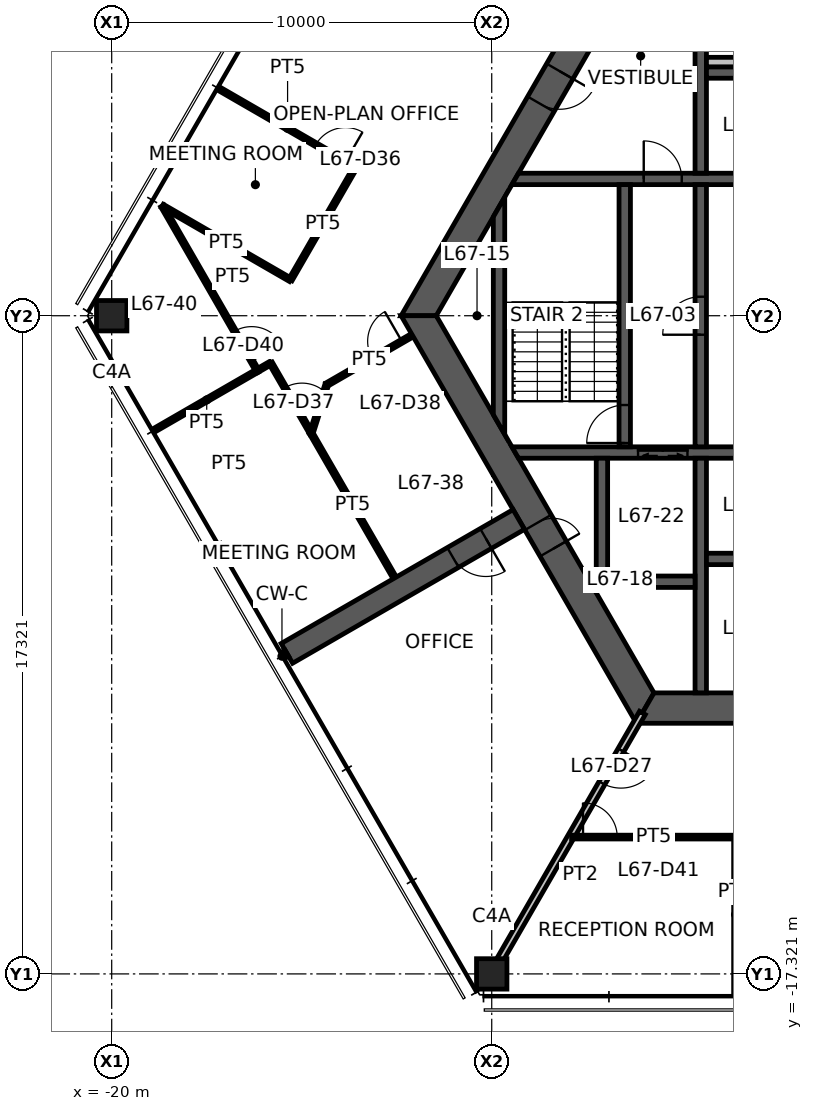
"""IFC4 building model, lengths in metres.
Left out: names, types, materials, properties, quantities, classifications, styles, units other than length and angle.
Written with IfcOpenShell. Run it as: python <this file> out.ifc"""

import sys

from ifc_helpers import new_model, si_unit, direction, frame, frame_2d, origin, origin_2d, place, context, subcontext, project, spatial, polyline, rectangle, hollow_rectangle, outline, extrude, element, fill, save


model = new_model("IFC4")
c1 = context("Model", 3, precision=1e-05, world=origin(), true_north=direction((0.0, 1.0)))
c2 = subcontext(c1, "Body", "Model", "MODEL_VIEW")
j1 = project(units=[si_unit("LENGTHUNIT", "METRE"), si_unit("PLANEANGLEUNIT", "RADIAN")], contexts=[c1])
p1 = place(None, origin())
s1 = spatial("IfcSite", under=j1, at=p1, CompositionType="ELEMENT")
p2 = place(p1, origin())
s2 = spatial("IfcBuilding", under=s1, at=p2, CompositionType="ELEMENT")
p3 = place(p2, frame((0.0, 0.0, 267.4)))
s3 = spatial("IfcBuildingStorey", under=s2, at=p3, CompositionType="ELEMENT", Elevation=267.4)
for number, where, z_axis, x_axis in (
    (1, (-20.0, 0.0, 0.0), (0.0, 0.0, 1.0), (1.0, 0.0, 0.0)),
    (2, (-10.0, -17.321, 0.0), (0.0, 0.0, 1.0), (1.0, 0.0, 0.0)),
):
    element("IfcColumn", number, at=place(p3, frame(where, z_axis=z_axis, x_axis=x_axis)), inside=s3, PredefinedType="COLUMN", context=c2, shape_type="SweptSolid", body=[
        extrude(hollow_rectangle(XDim=0.8, YDim=0.8, WallThickness=0.04, at=origin_2d()), origin(), (0.0, 0.0, 1.0), 3.9),
    ])
p4 = place(p3, frame((-5.961, 10.325, 0.0), z_axis=(0.0, 0.0, 1.0), x_axis=(-0.500004296715, -0.866022923061, 0.0)))
e3 = element("IfcWall", 3, at=p4, inside=s3, PredefinedType="SHEAR", context=c2, shape_type="SweptSolid", body=[
    extrude(outline(polyline([(-0.231, -0.4), (4.494, -0.4), (5.494, -0.4), (12.153, -0.4), (11.691, 0.4), (5.494, 0.4), (4.494, 0.4), (0.231, 0.4), (-0.231, -0.4)])), origin(), (0.0, 0.0, 1.0), 3.9),
])
p5 = place(p4, frame((4.494, 0.0, 0.0)))
e4 = element("IfcOpeningElement", 4, at=p5, cuts=e3, PredefinedType="OPENING", context=c2, shape_type="SweptSolid", body=[
    extrude(rectangle(XDim=1.0, YDim=2.1, at=frame_2d((0.5, 1.05))), frame((0.0, 0.41, 0.0), z_axis=(0.0, -1.0, 0.0), x_axis=(1.0, 0.0, 0.0)), (0.0, 0.0, 1.0), 0.82),
])
p6 = place(p3, frame((-11.922, 0.0, 0.0), z_axis=(0.0, 0.0, 1.0), x_axis=(0.500004296715, -0.866022923061, 0.0)))
e5 = element("IfcWall", 5, at=p6, inside=s3, PredefinedType="SHEAR", context=c2, shape_type="SweptSolid", body=[
    extrude(outline(polyline([(-0.231, -0.4), (6.281, -0.4), (7.081, -0.4), (12.153, -0.4), (11.691, 0.4), (7.081, 0.4), (6.281, 0.4), (0.231, 0.4), (-0.231, -0.4)])), origin(), (0.0, 0.0, 1.0), 3.9),
])
p7 = place(p6, frame((6.281, 0.0, 0.0)))
e6 = element("IfcOpeningElement", 6, at=p7, cuts=e5, PredefinedType="OPENING", context=c2, shape_type="SweptSolid", body=[
    extrude(rectangle(XDim=0.8, YDim=2.1, at=frame_2d((0.4, 1.05))), frame((0.0, 0.41, 0.0), z_axis=(0.0, -1.0, 0.0), x_axis=(1.0, 0.0, 0.0)), (0.0, 0.0, 1.0), 0.82),
])
p8 = place(p3, frame((-5.961, -10.325, 0.0), z_axis=(0.0, 0.0, 1.0), x_axis=(1.0, 0.0, 0.0)))
e7 = element("IfcWall", 7, at=p8, inside=s3, PredefinedType="SHEAR", context=c2, shape_type="SweptSolid", body=[
    extrude(outline(polyline([(-0.231, -0.4), (5.461, -0.4), (6.461, -0.4), (12.153, -0.4), (11.691, 0.4), (6.461, 0.4), (5.461, 0.4), (0.231, 0.4), (-0.231, -0.4)])), origin(), (0.0, 0.0, 1.0), 3.9),
])
p9 = place(p8, frame((5.461, 0.0, 0.0)))
e8 = element("IfcOpeningElement", 8, at=p9, cuts=e7, PredefinedType="OPENING", context=c2, shape_type="SweptSolid", body=[
    extrude(rectangle(XDim=1.0, YDim=2.1, at=frame_2d((0.5, 1.05))), frame((0.0, 0.41, 0.0), z_axis=(0.0, -1.0, 0.0), x_axis=(1.0, 0.0, 0.0)), (0.0, 0.0, 1.0), 0.82),
])
p10 = place(p3, frame((-9.288, -5.363, 0.0), z_axis=(0.0, 0.0, 1.0), x_axis=(-0.866027473358, -0.499996415376, 0.0)))
e9 = element("IfcWall", 9, at=p10, inside=s3, PredefinedType="SHEAR", context=c2, shape_type="SweptSolid", body=[
    extrude(rectangle(XDim=7.045, YDim=0.6, at=frame_2d((3.523, 0.0))), origin(), (0.0, 0.0, 1.0), 3.9),
])
p11 = place(p10, frame((1.0, 0.0, 0.0)))
e10 = element("IfcOpeningElement", 10, at=p11, cuts=e9, PredefinedType="OPENING", context=c2, shape_type="SweptSolid", body=[
    extrude(rectangle(XDim=1.0, YDim=2.1, at=frame_2d((0.5, 1.05))), frame((0.0, 0.31, 0.0), z_axis=(0.0, -1.0, 0.0), x_axis=(1.0, 0.0, 0.0)), (0.0, 0.0, 1.0), 0.62),
])
p12 = place(p3, frame((-9.382, 3.6, 0.0), z_axis=(0.0, 0.0, 1.0), x_axis=(1.0, 0.0, 0.0)))
e11 = element("IfcWall", 11, at=p12, inside=s3, PredefinedType="SHEAR", context=c2, shape_type="SweptSolid", body=[
    extrude(outline(polyline([(-0.087, -0.15), (3.382, -0.15), (4.382, -0.15), (5.782, -0.15), (6.882, -0.15), (7.932, -0.15), (7.932, 0.15), (6.882, 0.15), (5.782, 0.15), (4.382, 0.15), (3.382, 0.15), (0.087, 0.15), (-0.087, -0.15)])), origin(), (0.0, 0.0, 1.0), 3.9),
])
p13 = place(p12, frame((3.382, 0.0, 0.0)))
e12 = element("IfcOpeningElement", 12, at=p13, cuts=e11, PredefinedType="OPENING", context=c2, shape_type="SweptSolid", body=[
    extrude(rectangle(XDim=1.0, YDim=2.1, at=frame_2d((0.5, 1.05))), frame((0.0, 0.16, 0.0), z_axis=(0.0, -1.0, 0.0), x_axis=(1.0, 0.0, 0.0)), (0.0, 0.0, 1.0), 0.32),
])
p14 = place(p12, frame((5.782, 0.0, 0.0)))
e13 = element("IfcOpeningElement", 13, at=p14, cuts=e11, PredefinedType="OPENING", context=c2, shape_type="SweptSolid", body=[
    extrude(rectangle(XDim=1.1, YDim=2.1, at=frame_2d((0.55, 1.05))), frame((0.0, 0.16, 0.0), z_axis=(0.0, -1.0, 0.0), x_axis=(1.0, 0.0, 0.0)), (0.0, 0.0, 1.0), 0.32),
])
p15 = place(p3, frame((-9.382, -3.6, 0.0), z_axis=(0.0, 0.0, 1.0), x_axis=(1.0, 0.0, 0.0)))
e14 = element("IfcWall", 14, at=p15, inside=s3, PredefinedType="SHEAR", context=c2, shape_type="SweptSolid", body=[
    extrude(outline(polyline([(0.087, -0.15), (3.232, -0.15), (4.532, -0.15), (5.782, -0.15), (6.882, -0.15), (7.932, -0.15), (7.932, 0.15), (6.882, 0.15), (5.782, 0.15), (4.532, 0.15), (3.232, 0.15), (-0.087, 0.15), (0.087, -0.15)])), origin(), (0.0, 0.0, 1.0), 3.9),
])
p16 = place(p15, frame((5.782, 0.0, 0.0)))
e15 = element("IfcOpeningElement", 15, at=p16, cuts=e14, PredefinedType="OPENING", context=c2, shape_type="SweptSolid", body=[
    extrude(rectangle(XDim=1.1, YDim=2.1, at=frame_2d((0.55, 1.05))), frame((0.0, 0.16, 0.0), z_axis=(0.0, -1.0, 0.0), x_axis=(1.0, 0.0, 0.0)), (0.0, 0.0, 1.0), 0.32),
])
p17 = place(p15, frame((3.232, 0.0, 0.0)))
e16 = element("IfcOpeningElement", 16, at=p17, cuts=e14, PredefinedType="OPENING", context=c2, shape_type="SweptSolid", body=[
    extrude(rectangle(XDim=1.3, YDim=2.1, at=frame_2d((0.65, 1.05))), frame((0.0, 0.16, 0.0), z_axis=(0.0, -1.0, 0.0), x_axis=(1.0, 0.0, 0.0)), (0.0, 0.0, 1.0), 0.32),
])
p18 = place(p3, frame((-4.5, -3.45, 0.0), z_axis=(0.0, 0.0, 1.0), x_axis=(0.0, 1.0, 0.0)))
e17 = element("IfcWall", 17, at=p18, inside=s3, PredefinedType="SHEAR", context=c2, shape_type="SweptSolid", body=[
    extrude(rectangle(XDim=6.9, YDim=0.3, at=frame_2d((3.45, 0.0))), origin(), (0.0, 0.0, 1.0), 3.9),
])
p19 = place(p18, frame((2.95, 0.0, 0.0)))
e18 = element("IfcOpeningElement", 18, at=p19, cuts=e17, PredefinedType="OPENING", context=c2, shape_type="SweptSolid", body=[
    extrude(rectangle(XDim=1.0, YDim=2.1, at=frame_2d((0.5, 1.05))), frame((0.0, 0.16, 0.0), z_axis=(0.0, -1.0, 0.0), x_axis=(1.0, 0.0, 0.0)), (0.0, 0.0, 1.0), 0.32),
])
p20 = place(p3, frame((-6.5, -3.45, 0.0), z_axis=(0.0, 0.0, 1.0), x_axis=(0.0, 1.0, 0.0)))
e19 = element("IfcWall", 19, at=p20, inside=s3, PredefinedType="SHEAR", context=c2, shape_type="SweptSolid", body=[
    extrude(rectangle(XDim=6.9, YDim=0.3, at=frame_2d((3.45, 0.0))), origin(), (0.0, 0.0, 1.0), 3.9),
])
p21 = place(p20, frame((0.1, 0.0, 0.0)))
e20 = element("IfcOpeningElement", 20, at=p21, cuts=e19, PredefinedType="OPENING", context=c2, shape_type="SweptSolid", body=[
    extrude(rectangle(XDim=1.0, YDim=2.1, at=frame_2d((0.5, 1.05))), frame((0.0, 0.16, 0.0), z_axis=(0.0, -1.0, 0.0), x_axis=(1.0, 0.0, 0.0)), (0.0, 0.0, 1.0), 0.32),
])
for number, where, z_axis, x_axis in (
    (21, (-4.5, 3.75, 0.0), (0.0, 0.0, 1.0), (0.0, 1.0, 0.0)),
    (22, (-4.5, -3.75, 0.0), (0.0, 0.0, 1.0), (0.0, -1.0, 0.0)),
):
    element("IfcWall", number, at=place(p3, frame(where, z_axis=z_axis, x_axis=x_axis)), inside=s3, PredefinedType="SHEAR", context=c2, shape_type="SweptSolid", body=[
        extrude(rectangle(XDim=6.175, YDim=0.3, at=frame_2d((3.087, 0.0))), origin(), (0.0, 0.0, 1.0), 3.9),
    ])
for number, where, z_axis, x_axis in (
    (23, (-4.35, 6.4, 0.0), (0.0, 0.0, 1.0), (1.0, 0.0, 0.0)),
    (24, (-4.35, -6.4, 0.0), (0.0, 0.0, 1.0), (1.0, 0.0, 0.0)),
    (25, (-7.25, -7.0, 0.0), (0.0, 0.0, 1.0), (1.0, 0.0, 0.0)),
):
    element("IfcWall", number, at=place(p3, frame(where, z_axis=z_axis, x_axis=x_axis)), inside=s3, PredefinedType="SHEAR", context=c2, shape_type="SweptSolid", body=[
        extrude(rectangle(XDim=2.6, YDim=0.3, at=frame_2d((1.3, 0.0))), origin(), (0.0, 0.0, 1.0), 3.9),
    ])
p22 = place(p3, frame((-7.1, -3.75, 0.0), z_axis=(0.0, 0.0, 1.0), x_axis=(0.0, -1.0, 0.0)))
e26 = element("IfcWall", 26, at=p22, inside=s3, PredefinedType="SHEAR", context=c2, shape_type="SweptSolid", body=[
    extrude(rectangle(XDim=3.1, YDim=0.3, at=frame_2d((1.55, 0.0))), origin(), (0.0, 0.0, 1.0), 3.9),
])
p23 = place(p3, frame((-9.808, -2.862, 0.0), z_axis=(0.0, 0.0, 1.0), x_axis=(0.0, 1.0, 0.0)))
e27 = element("IfcWall", 27, at=p23, inside=s3, PredefinedType="SHEAR", context=c2, shape_type="SweptSolid", body=[
    extrude(outline(polyline([(-0.26, -0.15), (5.984, -0.15), (5.465, 0.15), (0.26, 0.15), (-0.26, -0.15)])), origin(), (0.0, 0.0, 1.0), 3.9),
])
p24 = place(p3, frame((-4.35, 6.675, 0.0), z_axis=(0.0, 0.0, 1.0), x_axis=(1.0, 0.0, 0.0)))
e28 = element("IfcWall", 28, at=p24, inside=s3, PredefinedType="PLUMBINGWALL", context=c2, shape_type="SweptSolid", body=[
    extrude(rectangle(XDim=2.6, YDim=0.25, at=frame_2d((1.3, 0.0))), origin(), (0.0, 0.0, 1.0), 3.9),
])
p25 = place(p3, frame((-6.035, -10.453, 0.0), z_axis=(0.0, 0.0, 1.0), x_axis=(-0.499989830942, -0.866031274813, 0.0)))
e29 = element("IfcWall", 29, at=p25, inside=s3, PredefinedType="PARTITIONING", context=c2, shape_type="SweptSolid", body=[
    extrude(rectangle(XDim=7.93, YDim=0.175, at=frame_2d((3.965, 0.0))), origin(), (0.0, 0.0, 1.0), 3.05),
])
p26 = place(p25, frame((1.13, 0.0, 0.0)))
e30 = element("IfcOpeningElement", 30, at=p26, cuts=e29, PredefinedType="OPENING", context=c2, shape_type="SweptSolid", body=[
    extrude(rectangle(XDim=1.0, YDim=2.1, at=frame_2d((0.5, 1.05))), frame((0.0, 0.098, 0.0), z_axis=(0.0, -1.0, 0.0), x_axis=(1.0, 0.0, 0.0)), (0.0, 0.0, 1.0), 0.195),
])
p27 = place(p3, frame((-17.154, 5.96, 0.0), z_axis=(0.0, 0.0, 1.0), x_axis=(0.866014662111, -0.500018604663, 0.0)))
e31 = element("IfcWall", 31, at=p27, inside=s3, PredefinedType="PARTITIONING", context=c2, shape_type="SweptSolid", body=[
    extrude(rectangle(XDim=4.115, YDim=0.1, at=frame_2d((2.058, 0.0))), origin(), (0.0, 0.0, 1.0), 2.95),
])
p28 = place(p27, frame((2.915, 0.0, 0.0)))
e32 = element("IfcOpeningElement", 32, at=p28, cuts=e31, PredefinedType="OPENING", context=c2, shape_type="SweptSolid", body=[
    extrude(rectangle(XDim=0.9, YDim=2.1, at=frame_2d((0.45, 1.05))), frame((0.0, 0.06, 0.0), z_axis=(0.0, -1.0, 0.0), x_axis=(1.0, 0.0, 0.0)), (0.0, 0.0, 1.0), 0.12),
])
p29 = place(p3, frame((-15.298, 0.945, 0.0), z_axis=(0.0, 0.0, 1.0), x_axis=(-0.866041390868, 0.499972308537, 0.0)))
e33 = element("IfcWall", 33, at=p29, inside=s3, PredefinedType="PARTITIONING", context=c2, shape_type="SweptSolid", body=[
    extrude(rectangle(XDim=3.891, YDim=0.1, at=frame_2d((1.945, 0.0))), origin(), (0.0, 0.0, 1.0), 2.95),
])
p30 = place(p3, frame((-13.59, 3.902, 0.0), z_axis=(0.0, 0.0, 1.0), x_axis=(-0.500021524473, -0.866012976267, 0.0)))
e34 = element("IfcWall", 34, at=p30, inside=s3, PredefinedType="PARTITIONING", context=c2, shape_type="SweptSolid", body=[
    extrude(rectangle(XDim=3.415, YDim=0.1, at=frame_2d((1.708, 0.0))), origin(), (0.0, 0.0, 1.0), 2.95),
])
p31 = place(p3, frame((-14.755, -3.085, 0.0), z_axis=(0.0, 0.0, 1.0), x_axis=(0.500006757851, -0.866021502102, 0.0)))
e35 = element("IfcWall", 35, at=p31, inside=s3, PredefinedType="PARTITIONING", context=c2, shape_type="SweptSolid", body=[
    extrude(rectangle(XDim=4.386, YDim=0.1, at=frame_2d((2.193, 0.0))), origin(), (0.0, 0.0, 1.0), 2.95),
])
p32 = place(p3, frame((-18.84, -2.99, 0.0), z_axis=(0.0, 0.0, 1.0), x_axis=(0.86601613395, 0.50001605548, 0.0)))
e36 = element("IfcWall", 36, at=p32, inside=s3, PredefinedType="PARTITIONING", context=c2, shape_type="SweptSolid", body=[
    extrude(rectangle(XDim=3.095, YDim=0.1, at=frame_2d((1.548, 0.0))), origin(), (0.0, 0.0, 1.0), 2.95),
])
p33 = place(p3, frame((-16.168, -1.447, 0.0), z_axis=(0.0, 0.0, 1.0), x_axis=(0.865894114129, 0.500227331437, 0.0)))
e37 = element("IfcWall", 37, at=p33, inside=s3, PredefinedType="PARTITIONING", context=c2, shape_type="SweptSolid", body=[
    extrude(rectangle(XDim=0.405, YDim=0.1, at=frame_2d((0.202, 0.0))), origin(), (0.0, 0.0, 1.0), 2.95),
])
p34 = place(p3, frame((-15.817, -1.244, 0.0), z_axis=(0.0, 0.0, 1.0), x_axis=(0.499986256893, -0.866033338225, 0.0)))
e38 = element("IfcWall", 38, at=p34, inside=s3, PredefinedType="PARTITIONING", context=c2, shape_type="SweptSolid", body=[
    extrude(rectangle(XDim=2.136, YDim=0.1, at=frame_2d((1.068, 0.0))), origin(), (0.0, 0.0, 1.0), 2.95),
])
p35 = place(p34, frame((0.75, 0.0, 0.0)))
e39 = element("IfcOpeningElement", 39, at=p35, cuts=e38, PredefinedType="OPENING", context=c2, shape_type="SweptSolid", body=[
    extrude(rectangle(XDim=0.9, YDim=2.1, at=frame_2d((0.45, 1.05))), frame((0.0, 0.06, 0.0), z_axis=(0.0, -1.0, 0.0), x_axis=(1.0, 0.0, 0.0)), (0.0, 0.0, 1.0), 0.12),
])
p36 = place(p3, frame((-14.749, -3.094, 0.0), z_axis=(0.0, 0.0, 1.0), x_axis=(0.30351815006, 0.952825656972, 0.0)))
e40 = element("IfcWall", 40, at=p36, inside=s3, PredefinedType="PARTITIONING", context=c2, shape_type="SweptSolid", body=[
    extrude(rectangle(XDim=1.346, YDim=0.1, at=frame_2d((0.673, 0.0))), origin(), (0.0, 0.0, 1.0), 2.95),
])
p37 = place(p3, frame((-14.341, -1.812, 0.0), z_axis=(0.0, 0.0, 1.0), x_axis=(0.86617456, 0.499741564819, 0.0)))
e41 = element("IfcWall", 41, at=p37, inside=s3, PredefinedType="PARTITIONING", context=c2, shape_type="SweptSolid", body=[
    extrude(rectangle(XDim=2.58, YDim=0.1, at=frame_2d((1.29, 0.0))), origin(), (0.0, 0.0, 1.0), 2.95),
])
p38 = place(p37, frame((1.381, 0.0, 0.0)))
e42 = element("IfcOpeningElement", 42, at=p38, cuts=e41, PredefinedType="OPENING", context=c2, shape_type="SweptSolid", body=[
    extrude(rectangle(XDim=0.9, YDim=2.1, at=frame_2d((0.45, 1.05))), frame((0.0, 0.06, 0.0), z_axis=(0.0, -1.0, 0.0), x_axis=(1.0, 0.0, 0.0)), (0.0, 0.0, 1.0), 0.12),
])
p39 = place(p3, frame((-18.667, 2.89, 0.0), z_axis=(0.0, 0.0, 1.0), x_axis=(0.499397294175, -0.866373096634, 0.0)))
e43 = element("IfcWall", 43, at=p39, inside=s3, PredefinedType="PARTITIONING", context=c2, shape_type="SweptSolid", body=[
    extrude(rectangle(XDim=5.006, YDim=0.1, at=frame_2d((2.503, 0.0))), origin(), (0.0, 0.0, 1.0), 2.95),
])
p40 = place(p39, frame((3.806, 0.0, 0.0)))
e44 = element("IfcOpeningElement", 44, at=p40, cuts=e43, PredefinedType="OPENING", context=c2, shape_type="SweptSolid", body=[
    extrude(rectangle(XDim=0.9, YDim=2.1, at=frame_2d((0.45, 1.05))), frame((0.0, 0.06, 0.0), z_axis=(0.0, -1.0, 0.0), x_axis=(1.0, 0.0, 0.0)), (0.0, 0.0, 1.0), 0.12),
])
p41 = place(p3, frame((-7.898, -13.719, 0.0), z_axis=(0.0, 0.0, 1.0), x_axis=(0.999999974372, -0.000226398002, 0.0)))
e45 = element("IfcWall", 45, at=p41, inside=s3, PredefinedType="PARTITIONING", context=c2, shape_type="SweptSolid", body=[
    extrude(rectangle(XDim=4.313, YDim=0.1, at=frame_2d((2.157, 0.0))), origin(), (0.0, 0.0, 1.0), 2.95),
])
p42 = place(p41, frame((0.3, 0.0, 0.0)))
e46 = element("IfcOpeningElement", 46, at=p42, cuts=e45, PredefinedType="OPENING", context=c2, shape_type="SweptSolid", body=[
    extrude(rectangle(XDim=0.9, YDim=2.1, at=frame_2d((0.45, 1.05))), frame((0.0, 0.06, 0.0), z_axis=(0.0, -1.0, 0.0), x_axis=(1.0, 0.0, 0.0)), (0.0, 0.0, 1.0), 0.12),
])
p43 = place(p3, frame((-15.39, -8.885, 0.0), z_axis=(0.0, 0.0, 1.0), x_axis=(-0.866622456874, -0.498964444867, 0.0)))
e47 = element("IfcWall", 47, at=p43, inside=s3, PredefinedType="PARTITIONING", context=c2, shape_type="SweptSolid", body=[
    extrude(rectangle(XDim=0.065, YDim=0.175, at=frame_2d((0.033, 0.0))), origin(), (0.0, 0.0, 1.0), 3.9),
])
p44 = place(p7, origin())
e48 = element("IfcDoor", 48, at=p44, inside=s3, OperationType="SINGLE_SWING_RIGHT", PredefinedType="DOOR", context=c2, shape_type="SweptSolid", body=[
    extrude(rectangle(XDim=0.8, YDim=2.1, at=frame_2d((0.4, 1.05))), frame((0.0, 0.025, 0.0), z_axis=(0.0, -1.0, 0.0), x_axis=(1.0, 0.0, 0.0)), (0.0, 0.0, 1.0), 0.05),
])
fill(e6, e48)
p45 = place(p5, origin())
e49 = element("IfcDoor", 49, at=p45, inside=s3, OperationType="SINGLE_SWING_LEFT", PredefinedType="DOOR", context=c2, shape_type="SweptSolid", body=[
    extrude(rectangle(XDim=1.0, YDim=2.1, at=frame_2d((0.5, 1.05))), frame((0.0, 0.025, 0.0), z_axis=(0.0, -1.0, 0.0), x_axis=(1.0, 0.0, 0.0)), (0.0, 0.0, 1.0), 0.05),
])
fill(e4, e49)
p46 = place(p19, origin())
e50 = element("IfcDoor", 50, at=p46, inside=s3, OperationType="SINGLE_SWING_LEFT", PredefinedType="DOOR", context=c2, shape_type="SweptSolid", body=[
    extrude(rectangle(XDim=1.0, YDim=2.1, at=frame_2d((0.5, 1.05))), frame((0.0, 0.025, 0.0), z_axis=(0.0, -1.0, 0.0), x_axis=(1.0, 0.0, 0.0)), (0.0, 0.0, 1.0), 0.05),
])
fill(e18, e50)
p47 = place(p21, origin())
e51 = element("IfcDoor", 51, at=p47, inside=s3, OperationType="SINGLE_SWING_LEFT", PredefinedType="DOOR", context=c2, shape_type="SweptSolid", body=[
    extrude(rectangle(XDim=1.0, YDim=2.1, at=frame_2d((0.5, 1.05))), frame((0.0, 0.025, 0.0), z_axis=(0.0, -1.0, 0.0), x_axis=(1.0, 0.0, 0.0)), (0.0, 0.0, 1.0), 0.05),
])
fill(e20, e51)
p48 = place(p13, origin())
e52 = element("IfcDoor", 52, at=p48, inside=s3, OperationType="SINGLE_SWING_LEFT", PredefinedType="DOOR", context=c2, shape_type="SweptSolid", body=[
    extrude(rectangle(XDim=1.0, YDim=2.1, at=frame_2d((0.5, 1.05))), frame((0.0, 0.025, 0.0), z_axis=(0.0, -1.0, 0.0), x_axis=(1.0, 0.0, 0.0)), (0.0, 0.0, 1.0), 0.05),
])
fill(e12, e52)
p49 = place(p11, origin())
e53 = element("IfcDoor", 53, at=p49, inside=s3, OperationType="SINGLE_SWING_LEFT", PredefinedType="DOOR", context=c2, shape_type="SweptSolid", body=[
    extrude(rectangle(XDim=1.0, YDim=2.1, at=frame_2d((0.5, 1.05))), frame((0.0, 0.025, 0.0), z_axis=(0.0, -1.0, 0.0), x_axis=(1.0, 0.0, 0.0)), (0.0, 0.0, 1.0), 0.05),
])
fill(e10, e53)
p50 = place(p26, origin())
e54 = element("IfcDoor", 54, at=p50, inside=s3, OperationType="SINGLE_SWING_LEFT", PredefinedType="DOOR", context=c2, shape_type="SweptSolid", body=[
    extrude(rectangle(XDim=1.0, YDim=2.1, at=frame_2d((0.5, 1.05))), frame((0.0, 0.025, 0.0), z_axis=(0.0, -1.0, 0.0), x_axis=(1.0, 0.0, 0.0)), (0.0, 0.0, 1.0), 0.05),
])
fill(e30, e54)
p51 = place(p28, origin())
e55 = element("IfcDoor", 55, at=p51, inside=s3, OperationType="SINGLE_SWING_RIGHT", PredefinedType="DOOR", context=c2, shape_type="SweptSolid", body=[
    extrude(rectangle(XDim=0.9, YDim=2.1, at=frame_2d((0.45, 1.05))), frame((0.0, 0.025, 0.0), z_axis=(0.0, -1.0, 0.0), x_axis=(1.0, 0.0, 0.0)), (0.0, 0.0, 1.0), 0.05),
])
fill(e32, e55)
p52 = place(p35, origin())
e56 = element("IfcDoor", 56, at=p52, inside=s3, OperationType="SINGLE_SWING_RIGHT", PredefinedType="DOOR", context=c2, shape_type="SweptSolid", body=[
    extrude(rectangle(XDim=0.9, YDim=2.1, at=frame_2d((0.45, 1.05))), frame((0.0, 0.025, 0.0), z_axis=(0.0, -1.0, 0.0), x_axis=(1.0, 0.0, 0.0)), (0.0, 0.0, 1.0), 0.05),
])
fill(e39, e56)
p53 = place(p38, origin())
e57 = element("IfcDoor", 57, at=p53, inside=s3, OperationType="SINGLE_SWING_RIGHT", PredefinedType="DOOR", context=c2, shape_type="SweptSolid", body=[
    extrude(rectangle(XDim=0.9, YDim=2.1, at=frame_2d((0.45, 1.05))), frame((0.0, 0.025, 0.0), z_axis=(0.0, -1.0, 0.0), x_axis=(1.0, 0.0, 0.0)), (0.0, 0.0, 1.0), 0.05),
])
fill(e42, e57)
p54 = place(p40, origin())
e58 = element("IfcDoor", 58, at=p54, inside=s3, OperationType="SINGLE_SWING_RIGHT", PredefinedType="DOOR", context=c2, shape_type="SweptSolid", body=[
    extrude(rectangle(XDim=0.9, YDim=2.1, at=frame_2d((0.45, 1.05))), frame((0.0, 0.025, 0.0), z_axis=(0.0, -1.0, 0.0), x_axis=(1.0, 0.0, 0.0)), (0.0, 0.0, 1.0), 0.05),
])
fill(e44, e58)
p55 = place(p42, origin())
e59 = element("IfcDoor", 59, at=p55, inside=s3, OperationType="SINGLE_SWING_LEFT", PredefinedType="DOOR", context=c2, shape_type="SweptSolid", body=[
    extrude(rectangle(XDim=0.9, YDim=2.1, at=frame_2d((0.45, 1.05))), frame((0.0, 0.025, 0.0), z_axis=(0.0, -1.0, 0.0), x_axis=(1.0, 0.0, 0.0)), (0.0, 0.0, 1.0), 0.05),
])
fill(e46, e59)
p56 = place(p17, origin())
e60 = element("IfcDoor", 60, at=p56, inside=s3, OperationType="DOUBLE_DOOR_SLIDING", PredefinedType="DOOR", context=c2, shape_type="SweptSolid", body=[
    extrude(rectangle(XDim=1.3, YDim=2.1, at=frame_2d((0.65, 1.05))), frame((0.0, 0.025, 0.0), z_axis=(0.0, -1.0, 0.0), x_axis=(1.0, 0.0, 0.0)), (0.0, 0.0, 1.0), 0.05),
])
fill(e16, e60)
save(model, sys.argv[1])
